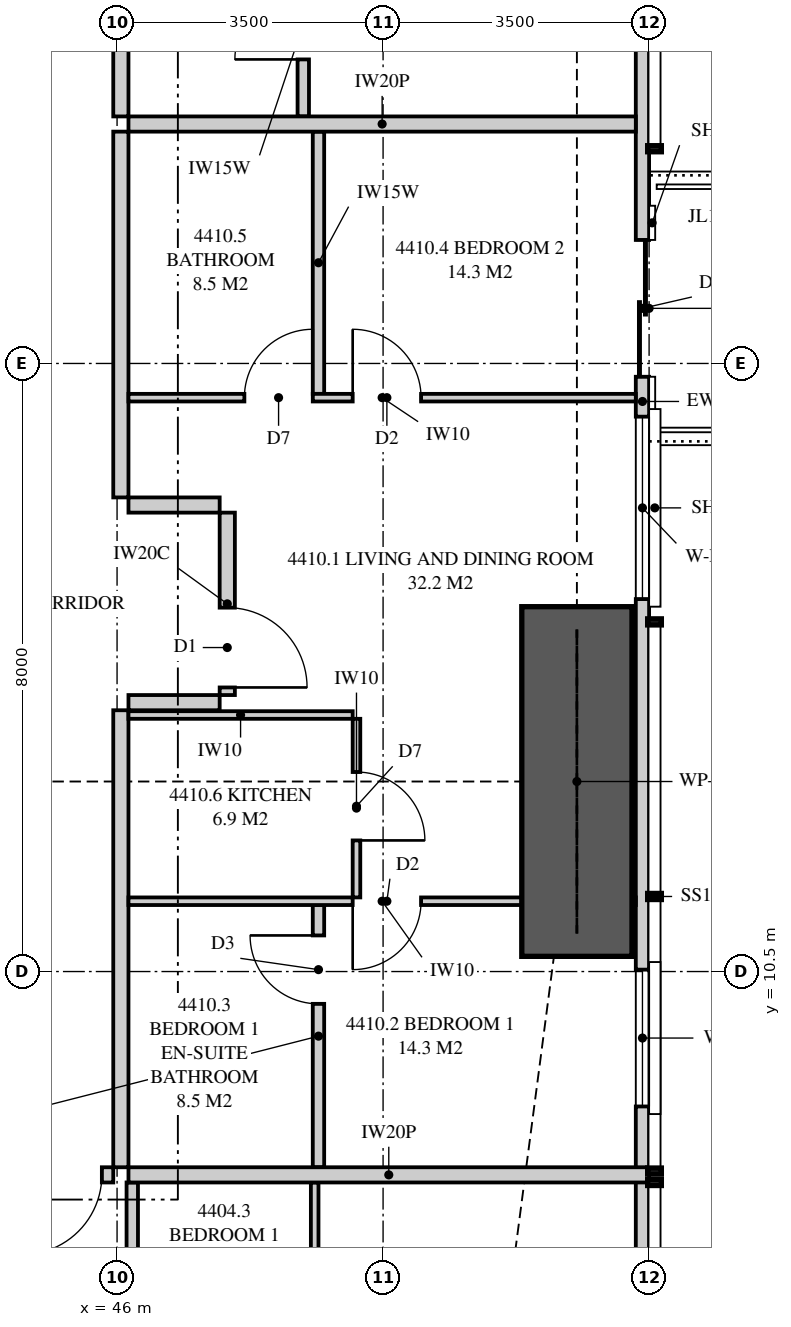
"""IFC4 building model, lengths in metres.
Left out: names, types, materials, properties, quantities, classifications, styles, units other than length and angle.
Written with IfcOpenShell. Run it as: python <this file> out.ifc"""

import sys

from ifc_helpers import new_model, si_unit, direction, frame, frame_2d, origin, place, context, subcontext, project, spatial, polyline, rectangle, outline, extrude, element, fill, save


model = new_model("IFC4")
c1 = context("Model", 3, precision=1e-05, world=origin(), true_north=direction((0.0, 1.0)))
c2 = subcontext(c1, "Body", "Model", "MODEL_VIEW")
j1 = project(units=[si_unit("LENGTHUNIT", "METRE"), si_unit("PLANEANGLEUNIT", "RADIAN")], contexts=[c1])
p1 = place(None, origin())
s1 = spatial("IfcSite", under=j1, at=p1, CompositionType="ELEMENT")
p2 = place(p1, origin())
s2 = spatial("IfcBuilding", under=s1, at=p2, CompositionType="ELEMENT")
p3 = place(p2, frame((0.0, 0.0, 164.4)))
s3 = spatial("IfcBuildingStorey", under=s2, at=p3, CompositionType="ELEMENT", Elevation=164.4)
p4 = place(p3, frame((52.913, 3.051, 0.0), z_axis=(0.0, 0.0, 1.0), x_axis=(0.0, 1.0, 0.0)))
e1 = element("IfcWall", 1, at=p4, inside=s3, PredefinedType="SOLIDWALL", context=c2, shape_type="SweptSolid", body=[
    extrude(outline(polyline([(0.0, 0.0), (29.897, 0.0), (29.897, 3.11), (22.167, 3.11), (22.167, 2.15), (22.074, 2.15), (22.074, 3.11), (21.949, 3.11), (21.949, 2.15), (9.949, 2.15), (9.949, 3.11), (9.847, 3.11), (9.847, 2.15), (9.706, 2.15), (9.706, 3.11), (0.0, 3.11), (0.0, 0.0)])), frame((0.0, 0.087, 0.0), z_axis=(0.0, -1.0, 0.0), x_axis=(1.0, 0.0, 0.0)), (0.0, 0.0, 1.0), 0.175),
])
p5 = place(p4, frame((1.797, 0.0, 0.4)))
e2 = element("IfcOpeningElement", 2, at=p5, cuts=e1, PredefinedType="OPENING", context=c2, shape_type="SweptSolid", body=[
    extrude(rectangle(XDim=1.8, YDim=1.7, at=frame_2d((0.9, 0.85))), frame((0.0, 0.097, 0.0), z_axis=(0.0, -1.0, 0.0), x_axis=(1.0, 0.0, 0.0)), (0.0, 0.0, 1.0), 0.195),
])
p6 = place(p4, frame((5.674, 0.0, 0.4)))
e3 = element("IfcOpeningElement", 3, at=p6, cuts=e1, PredefinedType="OPENING", context=c2, shape_type="SweptSolid", body=[
    extrude(rectangle(XDim=1.8, YDim=1.7, at=frame_2d((0.9, 0.85))), frame((0.0, 0.097, 0.0), z_axis=(0.0, -1.0, 0.0), x_axis=(1.0, 0.0, 0.0)), (0.0, 0.0, 1.0), 0.195),
])
p7 = place(p4, frame((12.349, 0.0, 0.4)))
e4 = element("IfcOpeningElement", 4, at=p7, cuts=e1, PredefinedType="OPENING", context=c2, shape_type="SweptSolid", body=[
    extrude(rectangle(XDim=2.4, YDim=1.7, at=frame_2d((1.2, 0.85))), frame((0.0, 0.097, 0.0), z_axis=(0.0, -1.0, 0.0), x_axis=(1.0, 0.0, 0.0)), (0.0, 0.0, 1.0), 0.195),
])
p8 = place(p4, frame((15.274, 0.0, 0.0)))
e5 = element("IfcOpeningElement", 5, at=p8, cuts=e1, PredefinedType="OPENING", context=c2, shape_type="SweptSolid", body=[
    extrude(rectangle(XDim=1.8, YDim=2.1, at=frame_2d((0.9, 1.05))), frame((0.0, 0.097, 0.0), z_axis=(0.0, -1.0, 0.0), x_axis=(1.0, 0.0, 0.0)), (0.0, 0.0, 1.0), 0.195),
])
p9 = place(p4, frame((24.373, 0.0, 0.4)))
e6 = element("IfcOpeningElement", 6, at=p9, cuts=e1, PredefinedType="OPENING", context=c2, shape_type="SweptSolid", body=[
    extrude(rectangle(XDim=1.2, YDim=1.7, at=frame_2d((0.6, 0.85))), frame((0.0, 0.097, 0.0), z_axis=(0.0, -1.0, 0.0), x_axis=(1.0, 0.0, 0.0)), (0.0, 0.0, 1.0), 0.195),
])
p10 = place(p4, frame((26.801, 0.0, 0.4)))
e7 = element("IfcOpeningElement", 7, at=p10, cuts=e1, PredefinedType="OPENING", context=c2, shape_type="SweptSolid", body=[
    extrude(rectangle(XDim=1.8, YDim=1.7, at=frame_2d((0.9, 0.85))), frame((0.0, 0.097, 0.0), z_axis=(0.0, -1.0, 0.0), x_axis=(1.0, 0.0, 0.0)), (0.0, 0.0, 1.0), 0.195),
])
p11 = place(p3, frame((42.05, 7.825, 0.0), z_axis=(0.0, 0.0, 1.0), x_axis=(1.0, 0.0, 0.0)))
e8 = element("IfcWall", 8, at=p11, inside=s3, PredefinedType="PARTITIONING", context=c2, shape_type="SweptSolid", body=[
    extrude(outline(polyline([(0.0, 0.0), (3.9, 0.0), (3.9, 3.11), (1.037, 3.11), (1.037, 2.541), (0.363, 2.541), (0.363, 3.11), (0.0, 3.11), (0.0, 0.0)])), frame((0.0, 0.1, 0.0), z_axis=(0.0, -1.0, 0.0), x_axis=(1.0, 0.0, 0.0)), (0.0, 0.0, 1.0), 0.2),
])
p12 = place(p11, frame((2.7, 0.0, 0.0)))
e9 = element("IfcOpeningElement", 9, at=p12, cuts=e8, PredefinedType="OPENING", context=c2, shape_type="SweptSolid", body=[
    extrude(rectangle(XDim=1.05, YDim=2.2, at=frame_2d((0.525, 1.1))), frame((0.0, 0.11, 0.0), z_axis=(0.0, -1.0, 0.0), x_axis=(1.0, 0.0, 0.0)), (0.0, 0.0, 1.0), 0.22),
])
p13 = place(p3, frame((48.6, 3.796, 0.0), z_axis=(0.0, 0.0, 1.0), x_axis=(0.0, 1.0, 0.0)))
e10 = element("IfcWall", 10, at=p13, inside=s3, PredefinedType="PARTITIONING", context=c2, shape_type="SweptSolid", body=[
    extrude(rectangle(XDim=3.929, YDim=0.1, at=frame_2d((1.964, 0.0))), origin(), (0.0, 0.0, 1.0), 3.11),
])
p14 = place(p13, frame((1.477, 0.0, 0.0)))
e11 = element("IfcOpeningElement", 11, at=p14, cuts=e10, PredefinedType="OPENING", context=c2, shape_type="SweptSolid", body=[
    extrude(rectangle(XDim=0.9, YDim=2.1, at=frame_2d((0.45, 1.05))), frame((0.0, 0.06, 0.0), z_axis=(0.0, -1.0, 0.0), x_axis=(1.0, 0.0, 0.0)), (0.0, 0.0, 1.0), 0.12),
])
p15 = place(p3, frame((46.2, 3.796, 0.0), z_axis=(0.0, 0.0, 1.0), x_axis=(0.0, 1.0, 0.0)))
e12 = element("IfcWall", 12, at=p15, inside=s3, PredefinedType="PLUMBINGWALL", context=c2, shape_type="SweptSolid", body=[
    extrude(rectangle(XDim=3.929, YDim=0.15, at=frame_2d((1.964, 0.0))), origin(), (0.0, 0.0, 1.0), 3.11),
])
p16 = place(p3, frame((46.15, 7.825, 0.0), z_axis=(0.0, 0.0, 1.0), x_axis=(1.0, 0.0, 0.0)))
e13 = element("IfcWall", 13, at=p16, inside=s3, PredefinedType="PARTITIONING", context=c2, shape_type="SweptSolid", body=[
    extrude(outline(polyline([(0.0, 0.0), (6.85, 0.0), (6.85, 3.11), (6.138, 3.11), (6.138, 2.15), (4.303, 2.15), (4.303, 3.11), (0.0, 3.11), (0.0, 0.0)])), frame((0.0, 0.1, 0.0), z_axis=(0.0, -1.0, 0.0), x_axis=(1.0, 0.0, 0.0)), (0.0, 0.0, 1.0), 0.2),
])
p17 = place(p3, frame((52.825, 21.65, 0.0), z_axis=(0.0, 0.0, 1.0), x_axis=(-1.0, 0.0, 0.0)))
e14 = element("IfcWall", 14, at=p17, inside=s3, PredefinedType="PARTITIONING", context=c2, shape_type="SweptSolid", body=[
    extrude(outline(polyline([(0.0, 0.0), (6.675, 0.0), (6.675, 3.11), (1.685, 3.11), (1.685, 2.15), (0.0, 2.15), (0.0, 3.11), (0.0, 0.0)])), frame((0.0, 0.1, 0.0), z_axis=(0.0, -1.0, 0.0), x_axis=(1.0, 0.0, 0.0)), (0.0, 0.0, 1.0), 0.2),
])
p18 = place(p3, frame((46.05, 7.925, 0.0), z_axis=(0.0, 0.0, 1.0), x_axis=(0.0, 1.0, 0.0)))
e15 = element("IfcWall", 15, at=p18, inside=s3, PredefinedType="PARTITIONING", context=c2, shape_type="SweptSolid", body=[
    extrude(outline(polyline([(0.0, 0.0), (6.012, 0.0), (6.012, 3.11), (5.412, 3.11), (5.412, 2.541), (4.738, 2.541), (4.738, 3.11), (0.0, 3.11), (0.0, 0.0)])), frame((0.0, 0.1, 0.0), z_axis=(0.0, -1.0, 0.0), x_axis=(1.0, 0.0, 0.0)), (0.0, 0.0, 1.0), 0.2),
])
p19 = place(p3, frame((52.825, 11.425, 0.0), z_axis=(0.0, 0.0, 1.0), x_axis=(-1.0, 0.0, 0.0)))
e16 = element("IfcWall", 16, at=p19, inside=s3, PredefinedType="PARTITIONING", context=c2, shape_type="SweptSolid", body=[
    extrude(outline(polyline([(0.115, 3.11), (0.0, 3.11), (0.0, 0.0), (0.529, 0.0), (0.529, 0.186), (1.021, 0.186), (1.021, 0.0), (6.675, 0.0), (6.675, 3.11), (1.849, 3.11), (1.849, 2.15), (1.021, 2.15), (1.021, 1.965), (0.529, 1.965), (0.529, 2.15), (0.115, 2.15), (0.115, 3.11)])), frame((0.0, 0.05, 0.0), z_axis=(0.0, -1.0, 0.0), x_axis=(1.0, 0.0, 0.0)), (0.0, 0.0, 1.0), 0.1),
])
p20 = place(p19, frame((2.825, 0.0, 0.0)))
e17 = element("IfcOpeningElement", 17, at=p20, cuts=e16, PredefinedType="OPENING", context=c2, shape_type="SweptSolid", body=[
    extrude(rectangle(XDim=0.9, YDim=2.1, at=frame_2d((0.45, 1.05))), frame((0.0, 0.06, 0.0), z_axis=(0.0, -1.0, 0.0), x_axis=(1.0, 0.0, 0.0)), (0.0, 0.0, 1.0), 0.12),
])
p21 = place(p3, frame((52.825, 18.05, 0.0), z_axis=(0.0, 0.0, 1.0), x_axis=(-1.0, 0.0, 0.0)))
e18 = element("IfcWall", 18, at=p21, inside=s3, PredefinedType="PARTITIONING", context=c2, shape_type="SweptSolid", body=[
    extrude(outline(polyline([(0.0, 0.0), (6.675, 0.0), (6.675, 3.11), (1.635, 3.11), (1.635, 2.15), (0.0, 2.15), (0.0, 3.11), (0.0, 0.0)])), frame((0.0, 0.05, 0.0), z_axis=(0.0, -1.0, 0.0), x_axis=(1.0, 0.0, 0.0)), (0.0, 0.0, 1.0), 0.1),
])
p22 = place(p21, frame((2.825, 0.0, 0.0)))
e19 = element("IfcOpeningElement", 19, at=p22, cuts=e18, PredefinedType="OPENING", context=c2, shape_type="SweptSolid", body=[
    extrude(rectangle(XDim=0.9, YDim=2.1, at=frame_2d((0.45, 1.05))), frame((0.0, 0.06, 0.0), z_axis=(0.0, -1.0, 0.0), x_axis=(1.0, 0.0, 0.0)), (0.0, 0.0, 1.0), 0.12),
])
p23 = place(p21, frame((4.25, 0.0, 0.0)))
e20 = element("IfcOpeningElement", 20, at=p23, cuts=e18, PredefinedType="OPENING", context=c2, shape_type="SweptSolid", body=[
    extrude(rectangle(XDim=0.9, YDim=2.1, at=frame_2d((0.45, 1.05))), frame((0.0, 0.06, 0.0), z_axis=(0.0, -1.0, 0.0), x_axis=(1.0, 0.0, 0.0)), (0.0, 0.0, 1.0), 0.12),
])
p24 = place(p3, frame((48.65, 7.925, 0.0), z_axis=(0.0, 0.0, 1.0), x_axis=(0.0, 1.0, 0.0)))
e21 = element("IfcWall", 21, at=p24, inside=s3, PredefinedType="PLUMBINGWALL", context=c2, shape_type="SweptSolid", body=[
    extrude(rectangle(XDim=3.45, YDim=0.15, at=frame_2d((1.725, 0.0))), origin(), (0.0, 0.0, 1.0), 3.11),
])
p25 = place(p24, frame((2.15, 0.0, 0.0)))
e22 = element("IfcOpeningElement", 22, at=p25, cuts=e21, PredefinedType="OPENING", context=c2, shape_type="SweptSolid", body=[
    extrude(rectangle(XDim=0.9, YDim=2.1, at=frame_2d((0.45, 1.05))), frame((0.0, 0.085, 0.0), z_axis=(0.0, -1.0, 0.0), x_axis=(1.0, 0.0, 0.0)), (0.0, 0.0, 1.0), 0.17),
])
p26 = place(p3, frame((48.65, 18.1, 0.0), z_axis=(0.0, 0.0, 1.0), x_axis=(0.0, 1.0, 0.0)))
e23 = element("IfcWall", 23, at=p26, inside=s3, PredefinedType="PLUMBINGWALL", context=c2, shape_type="SweptSolid", body=[
    extrude(rectangle(XDim=3.45, YDim=0.15, at=frame_2d((1.725, 0.0))), origin(), (0.0, 0.0, 1.0), 3.11),
])
p27 = place(p3, frame((49.15, 11.475, 0.0), z_axis=(0.0, 0.0, 1.0), x_axis=(0.0, 1.0, 0.0)))
e24 = element("IfcWall", 24, at=p27, inside=s3, PredefinedType="PARTITIONING", context=c2, shape_type="SweptSolid", body=[
    extrude(outline(polyline([(0.0, 0.0), (2.35, 0.0), (2.35, 3.11), (1.812, 3.11), (1.812, 2.541), (1.238, 2.541), (1.238, 3.11), (0.0, 3.11), (0.0, 0.0)])), frame((0.0, 0.05, 0.0), z_axis=(0.0, -1.0, 0.0), x_axis=(1.0, 0.0, 0.0)), (0.0, 0.0, 1.0), 0.1),
])
p28 = place(p27, frame((0.75, 0.0, 0.0)))
e25 = element("IfcOpeningElement", 25, at=p28, cuts=e24, PredefinedType="OPENING", context=c2, shape_type="SweptSolid", body=[
    extrude(rectangle(XDim=0.9, YDim=2.1, at=frame_2d((0.45, 1.05))), frame((0.0, 0.06, 0.0), z_axis=(0.0, -1.0, 0.0), x_axis=(1.0, 0.0, 0.0)), (0.0, 0.0, 1.0), 0.12),
])
p29 = place(p3, frame((49.1, 13.875, 0.0), z_axis=(0.0, 0.0, 1.0), x_axis=(-1.0, 0.0, 0.0)))
e26 = element("IfcWall", 26, at=p29, inside=s3, PredefinedType="PARTITIONING", context=c2, shape_type="SweptSolid", body=[
    extrude(rectangle(XDim=2.95, YDim=0.1, at=frame_2d((1.475, 0.0))), origin(), (0.0, 0.0, 1.0), 3.11),
])
p30 = place(p3, frame((46.05, 21.75, 0.0), z_axis=(0.0, 0.0, 1.0), x_axis=(0.0, 1.0, 0.0)))
e27 = element("IfcWall", 27, at=p30, inside=s3, PredefinedType="PARTITIONING", context=c2, shape_type="SweptSolid", body=[
    extrude(outline(polyline([(0.0, 0.0), (7.325, 0.0), (7.325, 3.11), (3.587, 3.11), (3.587, 2.541), (2.913, 2.541), (2.913, 3.11), (0.0, 3.11), (0.0, 0.0)])), frame((0.0, 0.1, 0.0), z_axis=(0.0, -1.0, 0.0), x_axis=(1.0, 0.0, 0.0)), (0.0, 0.0, 1.0), 0.2),
])
p31 = place(p30, frame((3.163, 0.0, 0.0)))
e28 = element("IfcOpeningElement", 28, at=p31, cuts=e27, PredefinedType="OPENING", context=c2, shape_type="SweptSolid", body=[
    extrude(rectangle(XDim=1.05, YDim=2.2, at=frame_2d((0.525, 1.1))), frame((0.0, 0.11, 0.0), z_axis=(0.0, -1.0, 0.0), x_axis=(1.0, 0.0, 0.0)), (0.0, 0.0, 1.0), 0.22),
])
p32 = place(p3, frame((48.45, 21.75, 0.0), z_axis=(0.0, 0.0, 1.0), x_axis=(0.0, 1.0, 0.0)))
e29 = element("IfcWall", 29, at=p32, inside=s3, PredefinedType="PLUMBINGWALL", context=c2, shape_type="SweptSolid", body=[
    extrude(rectangle(XDim=2.425, YDim=0.15, at=frame_2d((1.212, 0.0))), origin(), (0.0, 0.0, 1.0), 3.11),
])
p33 = place(p32, frame((0.75, 0.0, 0.0)))
e30 = element("IfcOpeningElement", 30, at=p33, cuts=e29, PredefinedType="OPENING", context=c2, shape_type="SweptSolid", body=[
    extrude(rectangle(XDim=0.9, YDim=2.1, at=frame_2d((0.45, 1.05))), frame((0.0, 0.085, 0.0), z_axis=(0.0, -1.0, 0.0), x_axis=(1.0, 0.0, 0.0)), (0.0, 0.0, 1.0), 0.17),
])
p34 = place(p3, frame((46.05, 16.738, 0.0), z_axis=(0.0, 0.0, 1.0), x_axis=(0.0, 1.0, 0.0)))
e31 = element("IfcWall", 31, at=p34, inside=s3, PredefinedType="PARTITIONING", context=c2, shape_type="SweptSolid", body=[
    extrude(rectangle(XDim=4.812, YDim=0.2, at=frame_2d((2.406, 0.0))), origin(), (0.0, 0.0, 1.0), 3.11),
])
p35 = place(p3, frame((47.45, 14.137, 0.0), z_axis=(0.0, 0.0, 1.0), x_axis=(0.0, 1.0, 0.0)))
e32 = element("IfcWall", 32, at=p35, inside=s3, PredefinedType="PARTITIONING", context=c2, shape_type="SweptSolid", body=[
    extrude(rectangle(XDim=2.4, YDim=0.2, at=frame_2d((1.2, 0.0))), origin(), (0.0, 0.0, 1.0), 3.11),
])
p36 = place(p35, frame((0.1, 0.0, 0.0)))
e33 = element("IfcOpeningElement", 33, at=p36, cuts=e32, PredefinedType="OPENING", context=c2, shape_type="SweptSolid", body=[
    extrude(rectangle(XDim=1.05, YDim=2.2, at=frame_2d((0.525, 1.1))), frame((0.0, 0.11, 0.0), z_axis=(0.0, -1.0, 0.0), x_axis=(1.0, 0.0, 0.0)), (0.0, 0.0, 1.0), 0.22),
])
for number, where, z_axis, x_axis in (
    (34, (46.15, 14.038, 0.0), (0.0, 0.0, 1.0), (1.0, 0.0, 0.0)),
    (35, (46.15, 16.637, 0.0), (0.0, 0.0, 1.0), (1.0, 0.0, 0.0)),
):
    element("IfcWall", number, at=place(p3, frame(where, z_axis=z_axis, x_axis=x_axis)), inside=s3, PredefinedType="PARTITIONING", context=c2, shape_type="SweptSolid", body=[
        extrude(rectangle(XDim=1.2, YDim=0.2, at=frame_2d((0.6, 0.0))), origin(), (0.0, 0.0, 1.0), 3.11),
    ])
p37 = place(p3, frame((52.05, 10.7, 0.0), z_axis=(0.0, 0.0, 1.0), x_axis=(0.0, 1.0, 0.0)))
e36 = element("IfcWall", 36, at=p37, inside=s3, PredefinedType="SHEAR", context=c2, shape_type="SweptSolid", body=[
    extrude(rectangle(XDim=4.6, YDim=1.45, at=frame_2d((2.3, 0.0))), origin(), (0.0, 0.0, 1.0), 3.35),
])
p38 = place(p6, origin())
e37 = element("IfcWindow", 37, at=p38, inside=s3, PartitioningType="SINGLE_PANEL", PredefinedType="WINDOW", context=c2, shape_type="SweptSolid", body=[
    extrude(rectangle(XDim=1.8, YDim=1.7, at=frame_2d((0.9, 0.85))), frame((0.0, 0.03, 0.0), z_axis=(0.0, -1.0, 0.0), x_axis=(1.0, 0.0, 0.0)), (0.0, 0.0, 1.0), 0.06),
])
fill(e3, e37)
p39 = place(p7, origin())
e38 = element("IfcWindow", 38, at=p39, inside=s3, PartitioningType="SINGLE_PANEL", PredefinedType="WINDOW", context=c2, shape_type="SweptSolid", body=[
    extrude(rectangle(XDim=2.4, YDim=1.7, at=frame_2d((1.2, 0.85))), frame((0.0, 0.03, 0.0), z_axis=(0.0, -1.0, 0.0), x_axis=(1.0, 0.0, 0.0)), (0.0, 0.0, 1.0), 0.06),
])
fill(e4, e38)
p40 = place(p8, origin())
e39 = element("IfcDoor", 39, at=p40, inside=s3, OperationType="SLIDING_TO_LEFT", PredefinedType="DOOR", context=c2, shape_type="SweptSolid", body=[
    extrude(rectangle(XDim=1.8, YDim=2.1, at=frame_2d((0.9, 1.05))), frame((0.0, 0.025, 0.0), z_axis=(0.0, -1.0, 0.0), x_axis=(1.0, 0.0, 0.0)), (0.0, 0.0, 1.0), 0.05),
])
fill(e5, e39)
p41 = place(p12, frame((1.05, 0.0, 0.0), z_axis=(0.0, 0.0, 1.0), x_axis=(-1.0, 0.0, 0.0)))
e40 = element("IfcDoor", 40, at=p41, inside=s3, OperationType="SINGLE_SWING_RIGHT", PredefinedType="DOOR", context=c2, shape_type="SweptSolid", body=[
    extrude(rectangle(XDim=1.05, YDim=2.2, at=frame_2d((0.525, 1.1))), frame((0.0, 0.025, 0.0), z_axis=(0.0, -1.0, 0.0), x_axis=(1.0, 0.0, 0.0)), (0.0, 0.0, 1.0), 0.05),
])
fill(e9, e40)
p42 = place(p36, frame((1.05, 0.0, 0.0), z_axis=(0.0, 0.0, 1.0), x_axis=(-1.0, 0.0, 0.0)))
e41 = element("IfcDoor", 41, at=p42, inside=s3, OperationType="SINGLE_SWING_RIGHT", PredefinedType="DOOR", context=c2, shape_type="SweptSolid", body=[
    extrude(rectangle(XDim=1.05, YDim=2.2, at=frame_2d((0.525, 1.1))), frame((0.0, 0.025, 0.0), z_axis=(0.0, -1.0, 0.0), x_axis=(1.0, 0.0, 0.0)), (0.0, 0.0, 1.0), 0.05),
])
fill(e33, e41)
p43 = place(p20, origin())
e42 = element("IfcDoor", 42, at=p43, inside=s3, OperationType="SINGLE_SWING_RIGHT", PredefinedType="DOOR", context=c2, shape_type="SweptSolid", body=[
    extrude(rectangle(XDim=0.9, YDim=2.1, at=frame_2d((0.45, 1.05))), frame((0.0, 0.025, 0.0), z_axis=(0.0, -1.0, 0.0), x_axis=(1.0, 0.0, 0.0)), (0.0, 0.0, 1.0), 0.05),
])
fill(e17, e42)
p44 = place(p25, origin())
e43 = element("IfcDoor", 43, at=p44, inside=s3, OperationType="SINGLE_SWING_RIGHT", PredefinedType="DOOR", context=c2, shape_type="SweptSolid", body=[
    extrude(rectangle(XDim=0.9, YDim=2.1, at=frame_2d((0.45, 1.05))), frame((0.0, 0.025, 0.0), z_axis=(0.0, -1.0, 0.0), x_axis=(1.0, 0.0, 0.0)), (0.0, 0.0, 1.0), 0.05),
])
fill(e22, e43)
p45 = place(p22, frame((0.9, 0.0, 0.0), z_axis=(0.0, 0.0, 1.0), x_axis=(-1.0, 0.0, 0.0)))
e44 = element("IfcDoor", 44, at=p45, inside=s3, OperationType="SINGLE_SWING_LEFT", PredefinedType="DOOR", context=c2, shape_type="SweptSolid", body=[
    extrude(rectangle(XDim=0.9, YDim=2.1, at=frame_2d((0.45, 1.05))), frame((0.0, 0.025, 0.0), z_axis=(0.0, -1.0, 0.0), x_axis=(1.0, 0.0, 0.0)), (0.0, 0.0, 1.0), 0.05),
])
fill(e19, e44)
p46 = place(p23, frame((0.9, 0.0, 0.0), z_axis=(0.0, 0.0, 1.0), x_axis=(-1.0, 0.0, 0.0)))
e45 = element("IfcDoor", 45, at=p46, inside=s3, OperationType="SINGLE_SWING_RIGHT", PredefinedType="DOOR", context=c2, shape_type="SweptSolid", body=[
    extrude(rectangle(XDim=0.9, YDim=2.1, at=frame_2d((0.45, 1.05))), frame((0.0, 0.025, 0.0), z_axis=(0.0, -1.0, 0.0), x_axis=(1.0, 0.0, 0.0)), (0.0, 0.0, 1.0), 0.05),
])
fill(e20, e45)
p47 = place(p28, frame((0.9, 0.0, 0.0), z_axis=(0.0, 0.0, 1.0), x_axis=(-1.0, 0.0, 0.0)))
e46 = element("IfcDoor", 46, at=p47, inside=s3, OperationType="SINGLE_SWING_RIGHT", PredefinedType="DOOR", context=c2, shape_type="SweptSolid", body=[
    extrude(rectangle(XDim=0.9, YDim=2.1, at=frame_2d((0.45, 1.05))), frame((0.0, 0.025, 0.0), z_axis=(0.0, -1.0, 0.0), x_axis=(1.0, 0.0, 0.0)), (0.0, 0.0, 1.0), 0.05),
])
fill(e25, e46)
p48 = place(p33, origin())
e47 = element("IfcDoor", 47, at=p48, inside=s3, OperationType="SINGLE_SWING_LEFT", PredefinedType="DOOR", context=c2, shape_type="SweptSolid", body=[
    extrude(rectangle(XDim=0.9, YDim=2.1, at=frame_2d((0.45, 1.05))), frame((0.0, 0.025, 0.0), z_axis=(0.0, -1.0, 0.0), x_axis=(1.0, 0.0, 0.0)), (0.0, 0.0, 1.0), 0.05),
])
fill(e30, e47)
save(model, sys.argv[1])
